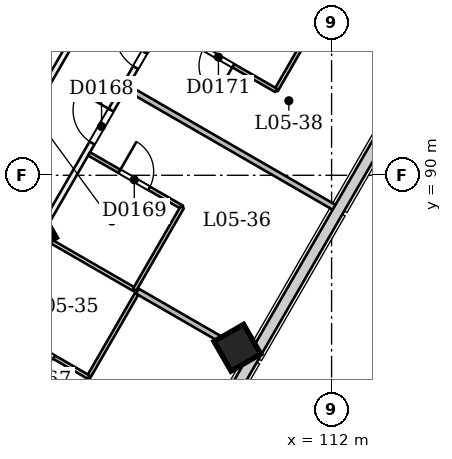
"""IFC4 building model, lengths in metres.
Left out: names, types, materials, properties, quantities, classifications, styles, units other than length and angle.
Written with IfcOpenShell. Run it as: python <this file> out.ifc"""

import sys

from ifc_helpers import new_model, si_unit, direction, frame, frame_2d, origin, origin_2d, place, context, subcontext, project, spatial, rectangle, extrude, element, fill, save


model = new_model("IFC4")
c1 = context("Model", 3, precision=1e-05, world=origin(), true_north=direction((0.0, 1.0)))
c2 = subcontext(c1, "Body", "Model", "MODEL_VIEW")
j1 = project(units=[si_unit("LENGTHUNIT", "METRE"), si_unit("PLANEANGLEUNIT", "RADIAN")], contexts=[c1])
p1 = place(None, origin())
s1 = spatial("IfcSite", under=j1, at=p1, CompositionType="ELEMENT")
p2 = place(p1, origin())
s2 = spatial("IfcBuilding", under=s1, at=p2, CompositionType="ELEMENT")
p3 = place(p2, frame((0.0, 0.0, 27.0)))
s3 = spatial("IfcBuildingStorey", under=s2, at=p3, CompositionType="ELEMENT", Elevation=27.0)
p4 = place(p3, frame((104.308, 88.44, -0.021), z_axis=(-0.02222134892, 0.038480872521, 0.999012229206), x_axis=(-0.500169939593, -0.865642180581, 0.022218162104)))
e1 = element("IfcColumn", 1, at=p4, inside=s3, PredefinedType="COLUMN", context=c2, shape_type="SweptSolid", body=[
    extrude(rectangle(XDim=0.7, YDim=0.7, at=origin_2d()), origin(), (0.0, 0.0, 1.0), 3.604),
])
p5 = place(p3, frame((109.547, 85.415, -0.027), z_axis=(-0.022153634206, 0.038480930364, 0.999013730882), x_axis=(-0.50131289949, -0.864981202213, 0.022201275242)))
e2 = element("IfcColumn", 2, at=p5, inside=s3, PredefinedType="COLUMN", context=c2, shape_type="SweptSolid", body=[
    extrude(rectangle(XDim=0.9, YDim=0.9, at=origin_2d()), origin(), (0.0, 0.0, 1.0), 3.604),
])
p6 = place(p3, frame((86.307, 57.264, 0.0), z_axis=(0.0, 0.0, 1.0), x_axis=(0.500000579958, 0.866025068945, 0.0)))
e3 = element("IfcWall", 3, at=p6, inside=s3, PredefinedType="PARTITIONING", context=c2, shape_type="SweptSolid", body=[
    extrude(rectangle(XDim=40.5, YDim=0.15, at=frame_2d((20.25, 0.0))), origin(), (0.0, 0.0, 1.0), 2.7),
])
p7 = place(p6, frame((0.72, 0.0, 0.0)))
e4 = element("IfcOpeningElement", 4, at=p7, cuts=e3, PredefinedType="OPENING", context=c2, shape_type="SweptSolid", body=[
    extrude(rectangle(XDim=1.0, YDim=2.1, at=frame_2d((0.5, 1.05))), frame((0.0, 0.085, 0.0), z_axis=(0.0, -1.0, 0.0), x_axis=(1.0, 0.0, 0.0)), (0.0, 0.0, 1.0), 0.171),
])
p8 = place(p6, frame((5.22, 0.0, 0.0)))
e5 = element("IfcOpeningElement", 5, at=p8, cuts=e3, PredefinedType="OPENING", context=c2, shape_type="SweptSolid", body=[
    extrude(rectangle(XDim=1.0, YDim=2.1, at=frame_2d((0.5, 1.05))), frame((0.0, 0.085, 0.0), z_axis=(0.0, -1.0, 0.0), x_axis=(1.0, 0.0, 0.0)), (0.0, 0.0, 1.0), 0.171),
])
p9 = place(p6, frame((11.78, 0.0, 0.0)))
e6 = element("IfcOpeningElement", 6, at=p9, cuts=e3, PredefinedType="OPENING", context=c2, shape_type="SweptSolid", body=[
    extrude(rectangle(XDim=1.0, YDim=2.1, at=frame_2d((0.5, 1.05))), frame((0.0, 0.085, 0.0), z_axis=(0.0, -1.0, 0.0), x_axis=(1.0, 0.0, 0.0)), (0.0, 0.0, 1.0), 0.171),
])
p10 = place(p6, frame((14.22, 0.0, 0.0)))
e7 = element("IfcOpeningElement", 7, at=p10, cuts=e3, PredefinedType="OPENING", context=c2, shape_type="SweptSolid", body=[
    extrude(rectangle(XDim=1.0, YDim=2.1, at=frame_2d((0.5, 1.05))), frame((0.0, 0.085, 0.0), z_axis=(0.0, -1.0, 0.0), x_axis=(1.0, 0.0, 0.0)), (0.0, 0.0, 1.0), 0.171),
])
p11 = place(p6, frame((19.75, 0.0, 0.0)))
e8 = element("IfcOpeningElement", 8, at=p11, cuts=e3, PredefinedType="OPENING", context=c2, shape_type="SweptSolid", body=[
    extrude(rectangle(XDim=1.0, YDim=2.1, at=frame_2d((0.5, 1.05))), frame((0.0, 0.085, 0.0), z_axis=(0.0, -1.0, 0.0), x_axis=(1.0, 0.0, 0.0)), (0.0, 0.0, 1.0), 0.171),
])
p12 = place(p6, frame((23.22, 0.0, 0.0)))
e9 = element("IfcOpeningElement", 9, at=p12, cuts=e3, PredefinedType="OPENING", context=c2, shape_type="SweptSolid", body=[
    extrude(rectangle(XDim=1.0, YDim=2.1, at=frame_2d((0.5, 1.05))), frame((0.0, 0.085, 0.0), z_axis=(0.0, -1.0, 0.0), x_axis=(1.0, 0.0, 0.0)), (0.0, 0.0, 1.0), 0.171),
])
p13 = place(p6, frame((29.895, 0.0, 0.0)))
e10 = element("IfcOpeningElement", 10, at=p13, cuts=e3, PredefinedType="OPENING", context=c2, shape_type="SweptSolid", body=[
    extrude(rectangle(XDim=1.0, YDim=2.1, at=frame_2d((0.5, 1.05))), frame((0.0, 0.085, 0.0), z_axis=(0.0, -1.0, 0.0), x_axis=(1.0, 0.0, 0.0)), (0.0, 0.0, 1.0), 0.171),
])
p14 = place(p6, frame((32.105, 0.0, 0.0)))
e11 = element("IfcOpeningElement", 11, at=p14, cuts=e3, PredefinedType="OPENING", context=c2, shape_type="SweptSolid", body=[
    extrude(rectangle(XDim=1.0, YDim=2.1, at=frame_2d((0.5, 1.05))), frame((0.0, 0.085, 0.0), z_axis=(0.0, -1.0, 0.0), x_axis=(1.0, 0.0, 0.0)), (0.0, 0.0, 1.0), 0.171),
])
p15 = place(p6, frame((38.78, 0.0, 0.0)))
e12 = element("IfcOpeningElement", 12, at=p15, cuts=e3, PredefinedType="OPENING", context=c2, shape_type="SweptSolid", body=[
    extrude(rectangle(XDim=1.0, YDim=2.1, at=frame_2d((0.5, 1.05))), frame((0.0, 0.085, 0.0), z_axis=(0.0, -1.0, 0.0), x_axis=(1.0, 0.0, 0.0)), (0.0, 0.0, 1.0), 0.171),
])
p16 = place(p3, frame((106.593, 92.4, 0.0), z_axis=(0.0, 0.0, 1.0), x_axis=(0.499968989506, 0.866043306961, 0.0)))
e13 = element("IfcWall", 13, at=p16, inside=s3, PredefinedType="PARTITIONING", context=c2, shape_type="SweptSolid", body=[
    extrude(rectangle(XDim=4.429, YDim=0.15, at=frame_2d((2.214, 0.0))), origin(), (0.0, 0.0, 1.0), 3.1),
])
p17 = place(p16, frame((0.5, 0.0, 0.0)))
e14 = element("IfcOpeningElement", 14, at=p17, cuts=e13, PredefinedType="OPENING", context=c2, shape_type="SweptSolid", body=[
    extrude(rectangle(XDim=1.1, YDim=2.1, at=frame_2d((0.55, 1.05))), frame((0.0, 0.085, 0.0), z_axis=(0.0, -1.0, 0.0), x_axis=(1.0, 0.0, 0.0)), (0.0, 0.0, 1.0), 0.171),
])
p18 = place(p3, frame((106.789, 96.34, 0.0), z_axis=(0.0, 0.0, 1.0), x_axis=(-0.499988785058, -0.866031878637, 0.0)))
e15 = element("IfcWall", 15, at=p18, inside=s3, PredefinedType="PARTITIONING", context=c2, shape_type="SweptSolid", body=[
    extrude(rectangle(XDim=4.549, YDim=0.15, at=frame_2d((2.275, 0.0))), origin(), (0.0, 0.0, 1.0), 3.1),
])
p19 = place(p3, frame((106.868, 86.876, 0.0), z_axis=(0.0, 0.0, 1.0), x_axis=(-0.499976333282, -0.866039067339, 0.0)))
e16 = element("IfcWall", 16, at=p19, inside=s3, PredefinedType="PARTITIONING", context=c2, shape_type="SweptSolid", body=[
    extrude(rectangle(XDim=2.525, YDim=0.1, at=frame_2d((1.262, 0.0))), origin(), (0.0, 0.0, 1.0), 2.7),
])
p20 = place(p3, frame((105.605, 84.69, 0.0), z_axis=(0.0, 0.0, 1.0), x_axis=(-0.866046596414, 0.499963291492, 0.0)))
e17 = element("IfcWall", 17, at=p20, inside=s3, PredefinedType="PARTITIONING", context=c2, shape_type="SweptSolid", body=[
    extrude(rectangle(XDim=2.925, YDim=0.1, at=frame_2d((1.462, 0.0))), origin(), (0.0, 0.0, 1.0), 3.1),
])
p21 = place(p20, frame((1.05, 0.0, 0.0)))
e18 = element("IfcOpeningElement", 18, at=p21, cuts=e17, PredefinedType="OPENING", context=c2, shape_type="SweptSolid", body=[
    extrude(rectangle(XDim=0.9, YDim=2.1, at=frame_2d((0.45, 1.05))), frame((0.0, 0.061, 0.0), z_axis=(0.0, -1.0, 0.0), x_axis=(1.0, 0.0, 0.0)), (0.0, 0.0, 1.0), 0.121),
])
p22 = place(p3, frame((109.85, 85.241, 0.0), z_axis=(0.0, 0.0, 1.0), x_axis=(-0.866020337685, 0.500008774639, 0.0)))
e19 = element("IfcWall", 19, at=p22, inside=s3, PredefinedType="PARTITIONING", context=c2, shape_type="SweptSolid", body=[
    extrude(rectangle(XDim=3.42, YDim=0.15, at=frame_2d((1.71, 0.0))), origin(), (0.0, 0.0, 1.0), 2.6),
])
p23 = place(p3, frame((106.819, 86.991, 0.0), z_axis=(0.0, 0.0, 1.0), x_axis=(-0.866048868473, 0.499959355765, 0.0)))
e20 = element("IfcWall", 20, at=p23, inside=s3, PredefinedType="PARTITIONING", context=c2, shape_type="SweptSolid", body=[
    extrude(rectangle(XDim=2.825, YDim=0.1, at=frame_2d((1.413, 0.0))), origin(), (0.0, 0.0, 1.0), 2.7),
])
p24 = place(p3, frame((105.619, 90.562, 0.0), z_axis=(0.0, 0.0, 1.0), x_axis=(0.867321505614, -0.497748335908, 0.0)))
e21 = element("IfcWall", 21, at=p24, inside=s3, PredefinedType="PARTITIONING", context=c2, shape_type="SweptSolid", body=[
    extrude(rectangle(XDim=2.825, YDim=0.1, at=frame_2d((1.412, 0.0))), origin(), (0.0, 0.0, 1.0), 3.1),
])
p25 = place(p24, frame((0.922, 0.0, 0.0)))
e22 = element("IfcOpeningElement", 22, at=p25, cuts=e21, PredefinedType="OPENING", context=c2, shape_type="SweptSolid", body=[
    extrude(rectangle(XDim=0.9, YDim=2.1, at=frame_2d((0.45, 1.05))), frame((0.0, 0.061, 0.0), z_axis=(0.0, -1.0, 0.0), x_axis=(1.0, 0.0, 0.0)), (0.0, 0.0, 1.0), 0.121),
])
p26 = place(p3, frame((108.069, 89.156, 0.0), z_axis=(0.0, 0.0, 1.0), x_axis=(-0.500004234368, -0.866022959057, 0.0)))
e23 = element("IfcWall", 23, at=p26, inside=s3, PredefinedType="PARTITIONING", context=c2, shape_type="SweptSolid", body=[
    extrude(rectangle(XDim=2.5, YDim=0.1, at=frame_2d((1.25, 0.0))), origin(), (0.0, 0.0, 1.0), 2.7),
])
p27 = place(p3, frame((112.117, 89.128, 0.0), z_axis=(0.0, 0.0, 1.0), x_axis=(-0.866025401434, 0.500000004071, 0.0)))
e24 = element("IfcWall", 24, at=p27, inside=s3, PredefinedType="PARTITIONING", context=c2, shape_type="SweptSolid", body=[
    extrude(rectangle(XDim=6.345, YDim=0.15, at=frame_2d((3.173, 0.0))), origin(), (0.0, 0.0, 1.0), 2.6),
])
p28 = place(p3, frame((111.813, 94.442, 0.0), z_axis=(0.0, 0.0, 1.0), x_axis=(-0.499948979701, -0.866054858364, 0.0)))
e25 = element("IfcWall", 25, at=p28, inside=s3, PredefinedType="PARTITIONING", context=c2, shape_type="SweptSolid", body=[
    extrude(rectangle(XDim=2.55, YDim=0.1, at=frame_2d((1.275, 0.0))), origin(), (0.0, 0.0, 1.0), 2.6),
])
p29 = place(p3, frame((110.539, 92.234, 0.0), z_axis=(0.0, 0.0, 1.0), x_axis=(-0.866050272892, 0.499956922968, 0.0)))
e26 = element("IfcWall", 26, at=p29, inside=s3, PredefinedType="PARTITIONING", context=c2, shape_type="SweptSolid", body=[
    extrude(rectangle(XDim=3.425, YDim=0.1, at=frame_2d((1.712, 0.0))), origin(), (0.0, 0.0, 1.0), 3.1),
])
p30 = place(p29, frame((1.3, 0.0, 0.0)))
e27 = element("IfcOpeningElement", 27, at=p30, cuts=e26, PredefinedType="OPENING", context=c2, shape_type="SweptSolid", body=[
    extrude(rectangle(XDim=0.9, YDim=2.1, at=frame_2d((0.45, 1.05))), frame((0.0, 0.061, 0.0), z_axis=(0.0, -1.0, 0.0), x_axis=(1.0, 0.0, 0.0)), (0.0, 0.0, 1.0), 0.121),
])
p31 = place(p3, frame((114.367, 93.025, 0.0), z_axis=(0.0, 0.0, 1.0), x_axis=(-0.866018406147, 0.500012120068, 0.0)))
e28 = element("IfcWall", 28, at=p31, inside=s3, PredefinedType="PARTITIONING", context=c2, shape_type="SweptSolid", body=[
    extrude(rectangle(XDim=6.42, YDim=0.1, at=frame_2d((3.21, 0.0))), origin(), (0.0, 0.0, 1.0), 2.6),
])
p32 = place(p21, origin())
e29 = element("IfcDoor", 29, at=p32, inside=s3, OperationType="SINGLE_SWING_RIGHT", PredefinedType="NOTDEFINED", context=c2, shape_type="SweptSolid", body=[
    extrude(rectangle(XDim=0.9, YDim=2.1, at=frame_2d((0.45, 1.05))), frame((0.0, 0.025, 0.0), z_axis=(0.0, -1.0, 0.0), x_axis=(1.0, 0.0, 0.0)), (0.0, 0.0, 1.0), 0.05),
])
fill(e18, e29)
p33 = place(p15, origin())
e30 = element("IfcDoor", 30, at=p33, inside=s3, OperationType="SINGLE_SWING_RIGHT", PredefinedType="NOTDEFINED", context=c2, shape_type="SweptSolid", body=[
    extrude(rectangle(XDim=1.0, YDim=2.1, at=frame_2d((0.5, 1.05))), frame((0.0, 0.025, 0.0), z_axis=(0.0, -1.0, 0.0), x_axis=(1.0, 0.0, 0.0)), (0.0, 0.0, 1.0), 0.05),
])
fill(e12, e30)
p34 = place(p25, origin())
e31 = element("IfcDoor", 31, at=p34, inside=s3, OperationType="SINGLE_SWING_LEFT", PredefinedType="NOTDEFINED", context=c2, shape_type="SweptSolid", body=[
    extrude(rectangle(XDim=0.9, YDim=2.1, at=frame_2d((0.45, 1.05))), frame((0.0, 0.025, 0.0), z_axis=(0.0, -1.0, 0.0), x_axis=(1.0, 0.0, 0.0)), (0.0, 0.0, 1.0), 0.05),
])
fill(e22, e31)
p35 = place(p17, origin())
e32 = element("IfcDoor", 32, at=p35, inside=s3, OperationType="SINGLE_SWING_RIGHT", PredefinedType="NOTDEFINED", context=c2, shape_type="SweptSolid", body=[
    extrude(rectangle(XDim=1.1, YDim=2.1, at=frame_2d((0.55, 1.05))), frame((0.0, 0.025, 0.0), z_axis=(0.0, -1.0, 0.0), x_axis=(1.0, 0.0, 0.0)), (0.0, 0.0, 1.0), 0.05),
])
fill(e14, e32)
p36 = place(p30, origin())
e33 = element("IfcDoor", 33, at=p36, inside=s3, OperationType="SINGLE_SWING_LEFT", PredefinedType="NOTDEFINED", context=c2, shape_type="SweptSolid", body=[
    extrude(rectangle(XDim=0.9, YDim=2.1, at=frame_2d((0.45, 1.05))), frame((0.0, 0.025, 0.0), z_axis=(0.0, -1.0, 0.0), x_axis=(1.0, 0.0, 0.0)), (0.0, 0.0, 1.0), 0.05),
])
fill(e27, e33)
save(model, sys.argv[1])
